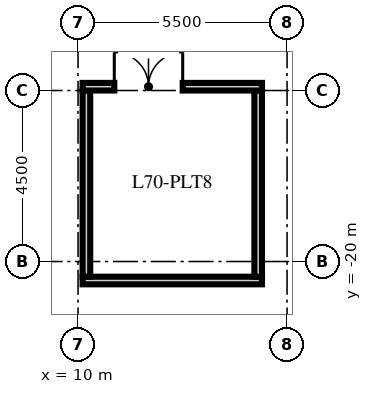
"""IFC4 building model, lengths in metres.
Left out: names, types, materials, properties, quantities, classifications, styles, units other than length and angle.
Written with IfcOpenShell. Run it as: python <this file> out.ifc"""

import sys

from ifc_helpers import new_model, si_unit, direction, frame, frame_2d, origin, origin_2d, place, context, subcontext, project, spatial, rectangle, extrude, element, fill, save


model = new_model("IFC4")
c1 = context("Model", 3, precision=1e-05, world=origin(), true_north=direction((0.0, 1.0)))
c2 = subcontext(c1, "Body", "Model", "MODEL_VIEW")
j1 = project(units=[si_unit("LENGTHUNIT", "METRE"), si_unit("PLANEANGLEUNIT", "RADIAN")], contexts=[c1])
p1 = place(None, origin())
s1 = spatial("IfcSite", under=j1, at=p1, CompositionType="ELEMENT")
p2 = place(p1, origin())
s2 = spatial("IfcBuilding", under=s1, at=p2, CompositionType="ELEMENT")
p3 = place(p2, frame((0.0, 0.0, 278.25)))
s3 = spatial("IfcBuildingStorey", under=s2, at=p3, CompositionType="ELEMENT", Elevation=278.25)
p4 = place(p3, frame((16.64, -24.4, -0.65), z_axis=(-0.203917129379, 0.327731366633, 0.922502008492), x_axis=(0.978988153279, 0.068255512614, 0.192154575114)))
e1 = element("IfcColumn", 1, at=p4, inside=s3, PredefinedType="COLUMN", context=c2, shape_type="SweptSolid", body=[
    extrude(rectangle(XDim=2.8, YDim=1.8, at=origin_2d()), origin(), (0.0, 0.0, 1.0), 8.238),
])
p5 = place(p3, frame((8.32, -24.4, -0.65), z_axis=(-0.103601510687, 0.332963994967, 0.937230870724), x_axis=(0.994618884766, 0.034712905596, 0.097612951251)))
e2 = element("IfcColumn", 2, at=p5, inside=s3, PredefinedType="COLUMN", context=c2, shape_type="SweptSolid", body=[
    extrude(rectangle(XDim=2.8, YDim=1.8, at=origin_2d()), origin(), (0.0, 0.0, 1.0), 8.109),
])
p6 = place(p3, frame((10.12, -20.5, 0.0), z_axis=(0.0, 0.0, 1.0), x_axis=(1.0, 0.0, 0.0)))
e3 = element("IfcWall", 3, at=p6, inside=s3, PredefinedType="SOLIDWALL", context=c2, shape_type="SweptSolid", body=[
    extrude(rectangle(XDim=4.72, YDim=0.2, at=frame_2d((2.36, 0.0))), origin(), (0.0, 0.0, 1.0), 6.25),
])
p7 = place(p3, frame((10.22, -20.4, 0.0), z_axis=(0.0, 0.0, 1.0), x_axis=(0.0, 1.0, 0.0)))
e4 = element("IfcWall", 4, at=p7, inside=s3, PredefinedType="SOLIDWALL", context=c2, shape_type="SweptSolid", body=[
    extrude(rectangle(XDim=4.9, YDim=0.2, at=frame_2d((2.45, 0.0))), origin(), (0.0, 0.0, 1.0), 7.25),
])
p8 = place(p3, frame((14.74, -20.4, 0.0), z_axis=(0.0, 0.0, 1.0), x_axis=(0.0, 1.0, 0.0)))
e5 = element("IfcWall", 5, at=p8, inside=s3, PredefinedType="SOLIDWALL", context=c2, shape_type="SweptSolid", body=[
    extrude(rectangle(XDim=4.9, YDim=0.2, at=frame_2d((2.45, 0.0))), origin(), (0.0, 0.0, 1.0), 6.25),
])
p9 = place(p3, frame((10.12, -15.4, 0.0), z_axis=(0.0, 0.0, 1.0), x_axis=(1.0, 0.0, 0.0)))
e6 = element("IfcWall", 6, at=p9, inside=s3, PredefinedType="SOLIDWALL", context=c2, shape_type="SweptSolid", body=[
    extrude(rectangle(XDim=4.72, YDim=0.2, at=frame_2d((2.36, 0.0))), origin(), (0.0, 0.0, 1.0), 6.25),
])
p10 = place(p9, frame((0.834, 0.0, 0.0)))
e7 = element("IfcOpeningElement", 7, at=p10, cuts=e6, PredefinedType="OPENING", context=c2, shape_type="SweptSolid", body=[
    extrude(rectangle(XDim=1.8, YDim=2.4, at=frame_2d((0.9, 1.2))), frame((0.0, 0.11, 0.0), z_axis=(0.0, -1.0, 0.0), x_axis=(1.0, 0.0, 0.0)), (0.0, 0.0, 1.0), 0.22),
])
p11 = place(p10, origin())
e8 = element("IfcDoor", 8, at=p11, inside=s3, OperationType="DOUBLE_DOOR_SINGLE_SWING", PredefinedType="DOOR", context=c2, shape_type="SweptSolid", body=[
    extrude(rectangle(XDim=1.8, YDim=2.4, at=frame_2d((0.9, 1.2))), frame((0.0, 0.025, 0.0), z_axis=(0.0, -1.0, 0.0), x_axis=(1.0, 0.0, 0.0)), (0.0, 0.0, 1.0), 0.05),
])
fill(e7, e8)
save(model, sys.argv[1])
